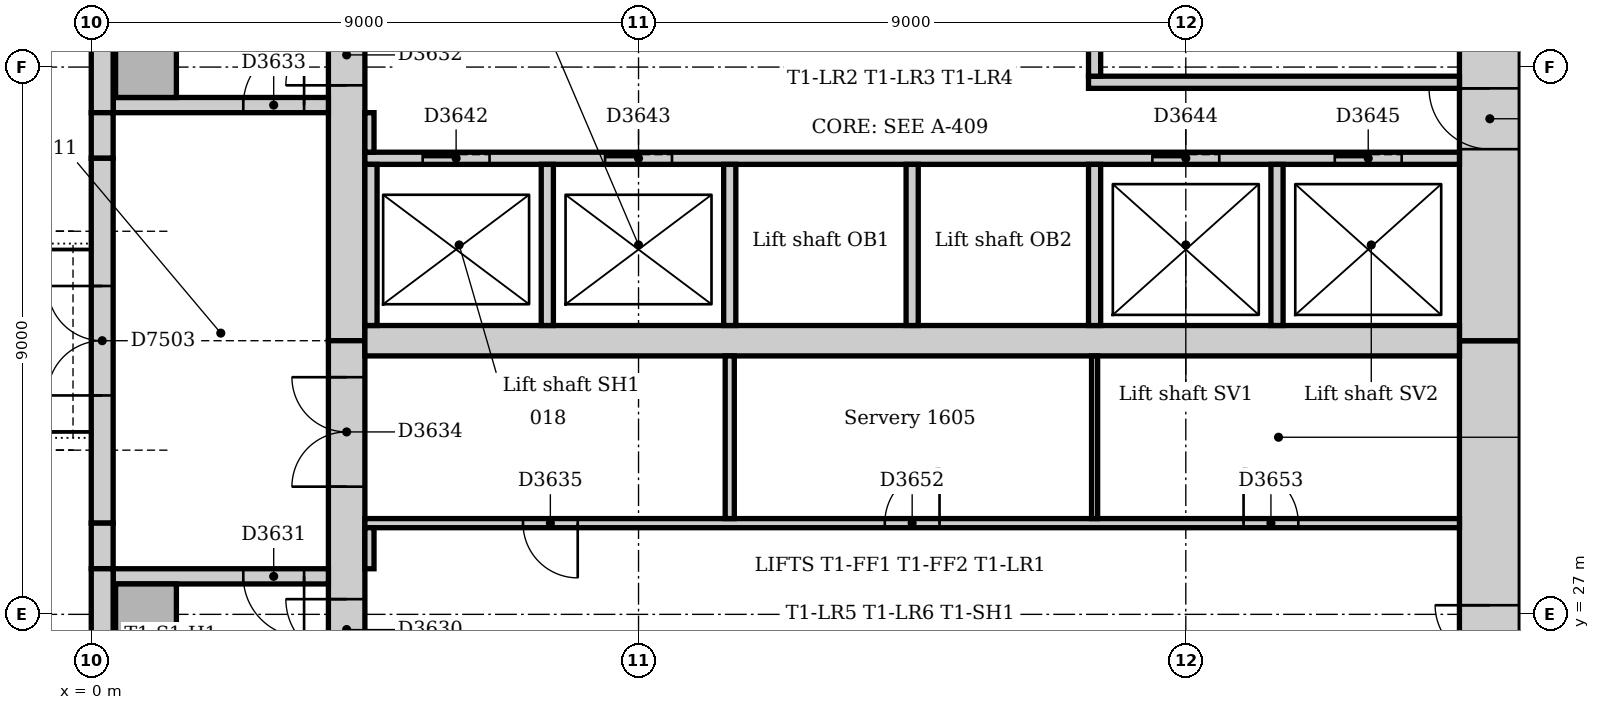
"""IFC4 building model, lengths in metres.
Left out: names, types, materials, properties, quantities, classifications, styles, units other than length and angle.
Written with IfcOpenShell. Run it as: python <this file> out.ifc"""

import sys

from ifc_helpers import new_model, si_unit, direction, frame, frame_2d, origin, origin_2d, place, context, subcontext, project, spatial, rectangle, extrude, element, fill, save


model = new_model("IFC4")
c1 = context("Model", 3, precision=1e-05, world=origin(), true_north=direction((0.0, 1.0)))
c2 = subcontext(c1, "Body", "Model", "MODEL_VIEW")
j1 = project(units=[si_unit("LENGTHUNIT", "METRE"), si_unit("PLANEANGLEUNIT", "RADIAN")], contexts=[c1])
p1 = place(None, origin())
s1 = spatial("IfcSite", under=j1, at=p1, CompositionType="ELEMENT")
p2 = place(p1, origin())
s2 = spatial("IfcBuilding", under=s1, at=p2, CompositionType="ELEMENT")
p3 = place(p2, frame((0.0, 0.0, 71.0)))
s3 = spatial("IfcBuildingStorey", under=s2, at=p3, CompositionType="ELEMENT", Elevation=71.0)
p4 = place(p3, frame((23.0, 21.0, 0.0), z_axis=(0.0, 0.0, 1.0), x_axis=(0.0, 1.0, 0.0)))
e1 = element("IfcWall", 1, at=p4, inside=s3, PredefinedType="SOLIDWALL", context=c2, shape_type="SweptSolid", body=[
    extrude(rectangle(XDim=10.5, YDim=1.0, at=frame_2d((5.25, 0.0))), origin(), (0.0, 0.0, 1.0), 4.0),
])
p5 = place(p4, frame((4.35, 0.0, 0.0)))
e2 = element("IfcOpeningElement", 2, at=p5, cuts=e1, PredefinedType="OPENING", context=c2, shape_type="SweptSolid", body=[
    extrude(rectangle(XDim=1.8, YDim=2.1, at=frame_2d((0.9, 1.05))), frame((0.0, 0.51, 0.0), z_axis=(0.0, -1.0, 0.0), x_axis=(1.0, 0.0, 0.0)), (0.0, 0.0, 1.0), 1.02),
])
p6 = place(p3, frame((23.0, 31.5, 0.0), z_axis=(0.0, 0.0, 1.0), x_axis=(0.0, 1.0, 0.0)))
e3 = element("IfcWall", 3, at=p6, inside=s3, PredefinedType="SOLIDWALL", context=c2, shape_type="SweptSolid", body=[
    extrude(rectangle(XDim=10.5, YDim=1.0, at=frame_2d((5.25, 0.0))), origin(), (0.0, 0.0, 1.0), 4.0),
])
p7 = place(p6, frame((3.15, 0.0, 0.0)))
e4 = element("IfcOpeningElement", 4, at=p7, cuts=e3, PredefinedType="OPENING", context=c2, shape_type="SweptSolid", body=[
    extrude(rectangle(XDim=1.0, YDim=2.1, at=frame_2d((0.5, 1.05))), frame((0.0, 0.51, 0.0), z_axis=(0.0, -1.0, 0.0), x_axis=(1.0, 0.0, 0.0)), (0.0, 0.0, 1.0), 1.02),
])
p8 = place(p6, frame((5.2, 0.0, 0.0)))
e5 = element("IfcOpeningElement", 5, at=p8, cuts=e3, PredefinedType="OPENING", context=c2, shape_type="SweptSolid", body=[
    extrude(rectangle(XDim=1.0, YDim=2.1, at=frame_2d((0.5, 1.05))), frame((0.0, 0.51, 0.0), z_axis=(0.0, -1.0, 0.0), x_axis=(1.0, 0.0, 0.0)), (0.0, 0.0, 1.0), 1.02),
])
p9 = place(p3, frame((4.2, 42.0, 0.0), z_axis=(0.0, 0.0, 1.0), x_axis=(0.0, -1.0, 0.0)))
e6 = element("IfcWall", 6, at=p9, inside=s3, PredefinedType="SOLIDWALL", context=c2, shape_type="SweptSolid", body=[
    extrude(rectangle(XDim=10.5, YDim=0.6, at=frame_2d((5.25, 0.0))), origin(), (0.0, 0.0, 1.0), 4.0),
])
p10 = place(p9, frame((5.3, 0.0, 0.0)))
e7 = element("IfcOpeningElement", 7, at=p10, cuts=e6, PredefinedType="OPENING", context=c2, shape_type="SweptSolid", body=[
    extrude(rectangle(XDim=1.0, YDim=2.1, at=frame_2d((0.5, 1.05))), frame((0.0, 0.31, 0.0), z_axis=(0.0, -1.0, 0.0), x_axis=(1.0, 0.0, 0.0)), (0.0, 0.0, 1.0), 0.62),
])
p11 = place(p3, frame((4.2, 31.5, 0.0), z_axis=(0.0, 0.0, 1.0), x_axis=(0.0, -1.0, 0.0)))
e8 = element("IfcWall", 8, at=p11, inside=s3, PredefinedType="SOLIDWALL", context=c2, shape_type="SweptSolid", body=[
    extrude(rectangle(XDim=10.5, YDim=0.6, at=frame_2d((5.25, 0.0))), origin(), (0.0, 0.0, 1.0), 4.0),
])
p12 = place(p11, frame((4.25, 0.0, 0.0)))
e9 = element("IfcOpeningElement", 9, at=p12, cuts=e8, PredefinedType="OPENING", context=c2, shape_type="SweptSolid", body=[
    extrude(rectangle(XDim=1.0, YDim=2.1, at=frame_2d((0.5, 1.05))), frame((0.0, 0.31, 0.0), z_axis=(0.0, -1.0, 0.0), x_axis=(1.0, 0.0, 0.0)), (0.0, 0.0, 1.0), 0.62),
])
p13 = place(p11, frame((0.6, 0.0, 0.0)))
e10 = element("IfcOpeningElement", 10, at=p13, cuts=e8, PredefinedType="OPENING", context=c2, shape_type="SweptSolid", body=[
    extrude(rectangle(XDim=1.8, YDim=2.1, at=frame_2d((0.9, 1.05))), frame((0.0, 0.31, 0.0), z_axis=(0.0, -1.0, 0.0), x_axis=(1.0, 0.0, 0.0)), (0.0, 0.0, 1.0), 0.62),
])
p14 = place(p3, frame((4.5, 31.5, 0.0), z_axis=(0.0, 0.0, 1.0), x_axis=(1.0, 0.0, 0.0)))
e11 = element("IfcWall", 11, at=p14, inside=s3, PredefinedType="SOLIDWALL", context=c2, shape_type="SweptSolid", body=[
    extrude(rectangle(XDim=18.0, YDim=0.5, at=frame_2d((9.0, 0.0))), origin(), (0.0, 0.0, 1.0), 4.0),
])
p15 = place(p3, frame((3.9, 27.625, 0.0), z_axis=(0.0, 0.0, 1.0), x_axis=(-1.0, 0.0, 0.0)))
e12 = element("IfcWall", 12, at=p15, inside=s3, PredefinedType="SOLIDWALL", context=c2, shape_type="SweptSolid", body=[
    extrude(rectangle(XDim=3.54, YDim=0.25, at=frame_2d((1.77, 0.0))), origin(), (0.0, 0.0, 1.0), 4.0),
])
p16 = place(p15, frame((0.4, 0.0, 0.0)))
e13 = element("IfcOpeningElement", 13, at=p16, cuts=e12, PredefinedType="OPENING", context=c2, shape_type="SweptSolid", body=[
    extrude(rectangle(XDim=1.0, YDim=2.1, at=frame_2d((0.5, 1.05))), frame((0.0, 0.135, 0.0), z_axis=(0.0, -1.0, 0.0), x_axis=(1.0, 0.0, 0.0)), (0.0, 0.0, 1.0), 0.27),
])
p17 = place(p3, frame((0.36, 35.375, 0.0), z_axis=(0.0, 0.0, 1.0), x_axis=(1.0, 0.0, 0.0)))
e14 = element("IfcWall", 14, at=p17, inside=s3, PredefinedType="SOLIDWALL", context=c2, shape_type="SweptSolid", body=[
    extrude(rectangle(XDim=3.54, YDim=0.25, at=frame_2d((1.77, 0.0))), origin(), (0.0, 0.0, 1.0), 4.0),
])
p18 = place(p17, frame((2.14, 0.0, 0.0)))
e15 = element("IfcOpeningElement", 15, at=p18, cuts=e14, PredefinedType="OPENING", context=c2, shape_type="SweptSolid", body=[
    extrude(rectangle(XDim=1.0, YDim=2.1, at=frame_2d((0.5, 1.05))), frame((0.0, 0.135, 0.0), z_axis=(0.0, -1.0, 0.0), x_axis=(1.0, 0.0, 0.0)), (0.0, 0.0, 1.0), 0.27),
])
for number, where, z_axis, x_axis in (
    (16, (0.9, 27.0, 0.0), (0.0, 0.0, 1.0), (1.0, 0.0, 0.0)),
    (17, (0.9, 36.0, 0.0), (0.0, 0.0, 1.0), (1.0, 0.0, 0.0)),
):
    element("IfcColumn", number, at=place(p3, frame(where, z_axis=z_axis, x_axis=x_axis)), inside=s3, PredefinedType="COLUMN", context=c2, shape_type="SweptSolid", body=[
        extrude(rectangle(XDim=1.0, YDim=1.0, at=origin_2d()), origin(), (0.0, 0.0, 1.0), 4.0),
    ])
p19 = place(p3, frame((0.18, 40.757, 0.0), z_axis=(0.0, 0.0, 1.0), x_axis=(0.0, -1.0, 0.0)))
e18 = element("IfcWall", 18, at=p19, inside=s3, PredefinedType="STANDARD", context=c2, shape_type="SweptSolid", body=[
    extrude(rectangle(XDim=5.507, YDim=0.36, at=frame_2d((2.754, 0.0))), origin(), (0.0, 0.0, 1.0), 3.85),
])
p20 = place(p3, frame((0.18, 35.25, 0.0), z_axis=(0.0, 0.0, 1.0), x_axis=(0.0, -1.0, 0.0)))
e19 = element("IfcWall", 19, at=p20, inside=s3, PredefinedType="STANDARD", context=c2, shape_type="SweptSolid", body=[
    extrude(rectangle(XDim=0.75, YDim=0.36, at=frame_2d((0.375, 0.0))), origin(), (0.0, 0.0, 1.0), 3.85),
])
p21 = place(p3, frame((0.18, 34.5, 0.0), z_axis=(0.0, 0.0, 1.0), x_axis=(0.0, -1.0, 0.0)))
e20 = element("IfcWall", 20, at=p21, inside=s3, PredefinedType="STANDARD", context=c2, shape_type="SweptSolid", body=[
    extrude(rectangle(XDim=6.0, YDim=0.36, at=frame_2d((3.0, 0.0))), origin(), (0.0, 0.0, 1.0), 3.85),
])
p22 = place(p21, frame((2.1, 0.0, 0.0)))
e21 = element("IfcOpeningElement", 21, at=p22, cuts=e20, PredefinedType="OPENING", context=c2, shape_type="SweptSolid", body=[
    extrude(rectangle(XDim=1.8, YDim=2.4, at=frame_2d((0.9, 1.2))), frame((0.0, 0.19, 0.0), z_axis=(0.0, -1.0, 0.0), x_axis=(1.0, 0.0, 0.0)), (0.0, 0.0, 1.0), 0.38),
])
p23 = place(p3, frame((0.18, 28.5, 0.0), z_axis=(0.0, 0.0, 1.0), x_axis=(0.0, -1.0, 0.0)))
e22 = element("IfcWall", 22, at=p23, inside=s3, PredefinedType="STANDARD", context=c2, shape_type="SweptSolid", body=[
    extrude(rectangle(XDim=0.75, YDim=0.36, at=frame_2d((0.375, 0.0))), origin(), (0.0, 0.0, 1.0), 3.85),
])
p24 = place(p3, frame((0.18, 27.75, 0.0), z_axis=(0.0, 0.0, 1.0), x_axis=(0.0, -1.0, 0.0)))
e23 = element("IfcWall", 23, at=p24, inside=s3, PredefinedType="STANDARD", context=c2, shape_type="SweptSolid", body=[
    extrude(rectangle(XDim=6.75, YDim=0.36, at=frame_2d((3.375, 0.0))), origin(), (0.0, 0.0, 1.0), 3.85),
])
p25 = place(p3, frame((16.4, 35.75, 0.0), z_axis=(0.0, 0.0, 1.0), x_axis=(1.0, 0.0, 0.0)))
e24 = element("IfcWall", 24, at=p25, inside=s3, PredefinedType="PARTITIONING", context=c2, shape_type="SweptSolid", body=[
    extrude(rectangle(XDim=6.1, YDim=0.2, at=frame_2d((3.05, 0.0))), origin(), (0.0, 0.0, 1.0), 3.85),
])
p26 = place(p3, frame((16.5, 35.85, 0.0), z_axis=(0.0, 0.0, 1.0), x_axis=(0.0, 1.0, 0.0)))
e25 = element("IfcWall", 25, at=p26, inside=s3, PredefinedType="PARTITIONING", context=c2, shape_type="SweptSolid", body=[
    extrude(rectangle(XDim=2.55, YDim=0.2, at=frame_2d((1.275, 0.0))), origin(), (0.0, 0.0, 1.0), 3.85),
])
p27 = place(p3, frame((4.5, 34.5, 0.0), z_axis=(0.0, 0.0, 1.0), x_axis=(1.0, 0.0, 0.0)))
e26 = element("IfcWall", 26, at=p27, inside=s3, PredefinedType="PARTITIONING", context=c2, shape_type="SweptSolid", body=[
    extrude(rectangle(XDim=18.0, YDim=0.2, at=frame_2d((9.0, 0.0))), origin(), (0.0, 0.0, 1.0), 3.85),
])
p28 = place(p27, frame((0.95, 0.0, 0.0)))
e27 = element("IfcOpeningElement", 27, at=p28, cuts=e26, PredefinedType="OPENING", context=c2, shape_type="SweptSolid", body=[
    extrude(rectangle(XDim=1.1, YDim=2.1, at=frame_2d((0.55, 1.05))), frame((0.0, 0.11, 0.0), z_axis=(0.0, -1.0, 0.0), x_axis=(1.0, 0.0, 0.0)), (0.0, 0.0, 1.0), 0.22),
])
p29 = place(p27, frame((3.95, 0.0, 0.0)))
e28 = element("IfcOpeningElement", 28, at=p29, cuts=e26, PredefinedType="OPENING", context=c2, shape_type="SweptSolid", body=[
    extrude(rectangle(XDim=1.1, YDim=2.1, at=frame_2d((0.55, 1.05))), frame((0.0, 0.11, 0.0), z_axis=(0.0, -1.0, 0.0), x_axis=(1.0, 0.0, 0.0)), (0.0, 0.0, 1.0), 0.22),
])
p30 = place(p27, frame((12.95, 0.0, 0.0)))
e29 = element("IfcOpeningElement", 29, at=p30, cuts=e26, PredefinedType="OPENING", context=c2, shape_type="SweptSolid", body=[
    extrude(rectangle(XDim=1.1, YDim=2.1, at=frame_2d((0.55, 1.05))), frame((0.0, 0.11, 0.0), z_axis=(0.0, -1.0, 0.0), x_axis=(1.0, 0.0, 0.0)), (0.0, 0.0, 1.0), 0.22),
])
p31 = place(p27, frame((15.95, 0.0, 0.0)))
e30 = element("IfcOpeningElement", 30, at=p31, cuts=e26, PredefinedType="OPENING", context=c2, shape_type="SweptSolid", body=[
    extrude(rectangle(XDim=1.1, YDim=2.1, at=frame_2d((0.55, 1.05))), frame((0.0, 0.11, 0.0), z_axis=(0.0, -1.0, 0.0), x_axis=(1.0, 0.0, 0.0)), (0.0, 0.0, 1.0), 0.22),
])
for number, where, z_axis, x_axis in (
    (31, (4.6, 31.75, 0.0), (0.0, 0.0, 1.0), (0.0, 1.0, 0.0)),
    (32, (7.5, 31.75, 0.0), (0.0, 0.0, 1.0), (0.0, 1.0, 0.0)),
    (33, (10.5, 31.75, 0.0), (0.0, 0.0, 1.0), (0.0, 1.0, 0.0)),
    (34, (13.5, 31.75, 0.0), (0.0, 0.0, 1.0), (0.0, 1.0, 0.0)),
    (35, (16.5, 31.75, 0.0), (0.0, 0.0, 1.0), (0.0, 1.0, 0.0)),
    (36, (19.5, 31.75, 0.0), (0.0, 0.0, 1.0), (0.0, 1.0, 0.0)),
):
    element("IfcWall", number, at=place(p3, frame(where, z_axis=z_axis, x_axis=x_axis)), inside=s3, PredefinedType="PARTITIONING", context=c2, shape_type="SweptSolid", body=[
        extrude(rectangle(XDim=2.65, YDim=0.2, at=frame_2d((1.325, 0.0))), origin(), (0.0, 0.0, 1.0), 3.85),
    ])
p32 = place(p3, frame((4.5, 28.5, 0.0), z_axis=(0.0, 0.0, 1.0), x_axis=(1.0, 0.0, 0.0)))
e37 = element("IfcWall", 37, at=p32, inside=s3, PredefinedType="PARTITIONING", context=c2, shape_type="SweptSolid", body=[
    extrude(rectangle(XDim=18.0, YDim=0.15, at=frame_2d((9.0, 0.0))), origin(), (0.0, 0.0, 1.0), 3.85),
])
p33 = place(p32, frame((2.6, 0.0, 0.0)))
e38 = element("IfcOpeningElement", 38, at=p33, cuts=e37, PredefinedType="OPENING", context=c2, shape_type="SweptSolid", body=[
    extrude(rectangle(XDim=0.9, YDim=2.1, at=frame_2d((0.45, 1.05))), frame((0.0, 0.085, 0.0), z_axis=(0.0, -1.0, 0.0), x_axis=(1.0, 0.0, 0.0)), (0.0, 0.0, 1.0), 0.17),
])
p34 = place(p32, frame((8.55, 0.0, 0.0)))
e39 = element("IfcOpeningElement", 39, at=p34, cuts=e37, PredefinedType="OPENING", context=c2, shape_type="SweptSolid", body=[
    extrude(rectangle(XDim=0.9, YDim=2.1, at=frame_2d((0.45, 1.05))), frame((0.0, 0.085, 0.0), z_axis=(0.0, -1.0, 0.0), x_axis=(1.0, 0.0, 0.0)), (0.0, 0.0, 1.0), 0.17),
])
p35 = place(p32, frame((14.45, 0.0, 0.0)))
e40 = element("IfcOpeningElement", 40, at=p35, cuts=e37, PredefinedType="OPENING", context=c2, shape_type="SweptSolid", body=[
    extrude(rectangle(XDim=0.9, YDim=2.1, at=frame_2d((0.45, 1.05))), frame((0.0, 0.085, 0.0), z_axis=(0.0, -1.0, 0.0), x_axis=(1.0, 0.0, 0.0)), (0.0, 0.0, 1.0), 0.17),
])
p36 = place(p3, frame((10.5, 28.575, 0.0), z_axis=(0.0, 0.0, 1.0), x_axis=(0.0, 1.0, 0.0)))
e41 = element("IfcWall", 41, at=p36, inside=s3, PredefinedType="PARTITIONING", context=c2, shape_type="SweptSolid", body=[
    extrude(rectangle(XDim=2.675, YDim=0.15, at=frame_2d((1.337, 0.0))), origin(), (0.0, 0.0, 1.0), 3.85),
])
p37 = place(p3, frame((4.575, 27.75, 0.0), z_axis=(0.0, 0.0, 1.0), x_axis=(0.0, 1.0, 0.0)))
e42 = element("IfcWall", 42, at=p37, inside=s3, PredefinedType="PARTITIONING", context=c2, shape_type="SweptSolid", body=[
    extrude(rectangle(XDim=0.675, YDim=0.15, at=frame_2d((0.338, 0.0))), origin(), (0.0, 0.0, 1.0), 3.85),
])
p38 = place(p3, frame((4.575, 34.6, 0.0), z_axis=(0.0, 0.0, 1.0), x_axis=(0.0, 1.0, 0.0)))
e43 = element("IfcWall", 43, at=p38, inside=s3, PredefinedType="PARTITIONING", context=c2, shape_type="SweptSolid", body=[
    extrude(rectangle(XDim=0.65, YDim=0.15, at=frame_2d((0.325, 0.0))), origin(), (0.0, 0.0, 1.0), 3.85),
])
p39 = place(p3, frame((16.5, 28.575, 0.0), z_axis=(0.0, 0.0, 1.0), x_axis=(0.0, 1.0, 0.0)))
e44 = element("IfcWall", 44, at=p39, inside=s3, PredefinedType="PARTITIONING", context=c2, shape_type="SweptSolid", body=[
    extrude(rectangle(XDim=2.675, YDim=0.1, at=frame_2d((1.337, 0.0))), origin(), (0.0, 0.0, 1.0), 3.85),
])
p40 = place(p22, frame((1.8, 0.0, 0.0), z_axis=(0.0, 0.0, 1.0), x_axis=(-1.0, 0.0, 0.0)))
e45 = element("IfcDoor", 45, at=p40, inside=s3, OperationType="DOUBLE_DOOR_SINGLE_SWING", PredefinedType="DOOR", context=c2, shape_type="SweptSolid", body=[
    extrude(rectangle(XDim=1.8, YDim=2.4, at=frame_2d((0.9, 1.2))), frame((0.0, -0.07, 0.0), z_axis=(0.0, -1.0, 0.0), x_axis=(1.0, 0.0, 0.0)), (0.0, 0.0, 1.0), 0.05),
])
fill(e21, e45)
p41 = place(p12, frame((1.0, 0.0, 0.0), z_axis=(0.0, 0.0, 1.0), x_axis=(-1.0, 0.0, 0.0)))
e46 = element("IfcDoor", 46, at=p41, inside=s3, OperationType="SINGLE_SWING_RIGHT", PredefinedType="DOOR", context=c2, shape_type="SweptSolid", body=[
    extrude(rectangle(XDim=1.0, YDim=2.1, at=frame_2d((0.5, 1.05))), frame((0.0, 0.025, 0.0), z_axis=(0.0, -1.0, 0.0), x_axis=(1.0, 0.0, 0.0)), (0.0, 0.0, 1.0), 0.05),
])
fill(e9, e46)
p42 = place(p16, origin())
e47 = element("IfcDoor", 47, at=p42, inside=s3, OperationType="SINGLE_SWING_LEFT", PredefinedType="DOOR", context=c2, shape_type="SweptSolid", body=[
    extrude(rectangle(XDim=1.0, YDim=2.1, at=frame_2d((0.5, 1.05))), frame((0.0, 0.025, 0.0), z_axis=(0.0, -1.0, 0.0), x_axis=(1.0, 0.0, 0.0)), (0.0, 0.0, 1.0), 0.05),
])
fill(e13, e47)
p43 = place(p10, frame((1.0, 0.0, 0.0), z_axis=(0.0, 0.0, 1.0), x_axis=(-1.0, 0.0, 0.0)))
e48 = element("IfcDoor", 48, at=p43, inside=s3, OperationType="SINGLE_SWING_LEFT", PredefinedType="DOOR", context=c2, shape_type="SweptSolid", body=[
    extrude(rectangle(XDim=1.0, YDim=2.1, at=frame_2d((0.5, 1.05))), frame((0.0, 0.025, 0.0), z_axis=(0.0, -1.0, 0.0), x_axis=(1.0, 0.0, 0.0)), (0.0, 0.0, 1.0), 0.05),
])
fill(e7, e48)
p44 = place(p18, origin())
e49 = element("IfcDoor", 49, at=p44, inside=s3, OperationType="SINGLE_SWING_RIGHT", PredefinedType="DOOR", context=c2, shape_type="SweptSolid", body=[
    extrude(rectangle(XDim=1.0, YDim=2.1, at=frame_2d((0.5, 1.05))), frame((0.0, 0.025, 0.0), z_axis=(0.0, -1.0, 0.0), x_axis=(1.0, 0.0, 0.0)), (0.0, 0.0, 1.0), 0.05),
])
fill(e15, e49)
p45 = place(p13, frame((1.8, 0.0, 0.0), z_axis=(0.0, 0.0, 1.0), x_axis=(-1.0, 0.0, 0.0)))
e50 = element("IfcDoor", 50, at=p45, inside=s3, OperationType="DOUBLE_DOOR_DOUBLE_SWING", PredefinedType="DOOR", context=c2, shape_type="SweptSolid", body=[
    extrude(rectangle(XDim=1.8, YDim=2.1, at=frame_2d((0.9, 1.05))), frame((0.0, 0.025, 0.0), z_axis=(0.0, -1.0, 0.0), x_axis=(1.0, 0.0, 0.0)), (0.0, 0.0, 1.0), 0.05),
])
fill(e10, e50)
p46 = place(p33, frame((0.9, 0.0, 0.0), z_axis=(0.0, 0.0, 1.0), x_axis=(-1.0, 0.0, 0.0)))
e51 = element("IfcDoor", 51, at=p46, inside=s3, OperationType="SINGLE_SWING_LEFT", PredefinedType="DOOR", context=c2, shape_type="SweptSolid", body=[
    extrude(rectangle(XDim=0.9, YDim=2.1, at=frame_2d((0.45, 1.05))), frame((0.0, 0.025, 0.0), z_axis=(0.0, -1.0, 0.0), x_axis=(1.0, 0.0, 0.0)), (0.0, 0.0, 1.0), 0.05),
])
fill(e38, e51)
p47 = place(p28, origin())
e52 = element("IfcDoor", 52, at=p47, inside=s3, OperationType="SLIDING_TO_LEFT", PredefinedType="DOOR", context=c2, shape_type="SweptSolid", body=[
    extrude(rectangle(XDim=1.1, YDim=2.1, at=frame_2d((0.55, 1.05))), frame((0.0, 0.025, 0.0), z_axis=(0.0, -1.0, 0.0), x_axis=(1.0, 0.0, 0.0)), (0.0, 0.0, 1.0), 0.05),
])
fill(e27, e52)
p48 = place(p29, origin())
e53 = element("IfcDoor", 53, at=p48, inside=s3, OperationType="SLIDING_TO_LEFT", PredefinedType="DOOR", context=c2, shape_type="SweptSolid", body=[
    extrude(rectangle(XDim=1.1, YDim=2.1, at=frame_2d((0.55, 1.05))), frame((0.0, 0.025, 0.0), z_axis=(0.0, -1.0, 0.0), x_axis=(1.0, 0.0, 0.0)), (0.0, 0.0, 1.0), 0.05),
])
fill(e28, e53)
p49 = place(p30, origin())
e54 = element("IfcDoor", 54, at=p49, inside=s3, OperationType="SLIDING_TO_LEFT", PredefinedType="DOOR", context=c2, shape_type="SweptSolid", body=[
    extrude(rectangle(XDim=1.1, YDim=2.1, at=frame_2d((0.55, 1.05))), frame((0.0, 0.025, 0.0), z_axis=(0.0, -1.0, 0.0), x_axis=(1.0, 0.0, 0.0)), (0.0, 0.0, 1.0), 0.05),
])
fill(e29, e54)
p50 = place(p31, origin())
e55 = element("IfcDoor", 55, at=p50, inside=s3, OperationType="SLIDING_TO_LEFT", PredefinedType="DOOR", context=c2, shape_type="SweptSolid", body=[
    extrude(rectangle(XDim=1.1, YDim=2.1, at=frame_2d((0.55, 1.05))), frame((0.0, 0.025, 0.0), z_axis=(0.0, -1.0, 0.0), x_axis=(1.0, 0.0, 0.0)), (0.0, 0.0, 1.0), 0.05),
])
fill(e30, e55)
p51 = place(p5, origin())
e56 = element("IfcDoor", 56, at=p51, inside=s3, OperationType="DOUBLE_DOOR_DOUBLE_SWING", PredefinedType="DOOR", context=c2, shape_type="SweptSolid", body=[
    extrude(rectangle(XDim=1.8, YDim=2.1, at=frame_2d((0.9, 1.05))), frame((0.0, 0.025, 0.0), z_axis=(0.0, -1.0, 0.0), x_axis=(1.0, 0.0, 0.0)), (0.0, 0.0, 1.0), 0.05),
])
fill(e2, e56)
p52 = place(p7, origin())
e57 = element("IfcDoor", 57, at=p52, inside=s3, OperationType="SINGLE_SWING_RIGHT", PredefinedType="DOOR", context=c2, shape_type="SweptSolid", body=[
    extrude(rectangle(XDim=1.0, YDim=2.1, at=frame_2d((0.5, 1.05))), frame((0.0, 0.025, 0.0), z_axis=(0.0, -1.0, 0.0), x_axis=(1.0, 0.0, 0.0)), (0.0, 0.0, 1.0), 0.05),
])
fill(e4, e57)
p53 = place(p34, origin())
e58 = element("IfcDoor", 58, at=p53, inside=s3, OperationType="SINGLE_SWING_RIGHT", PredefinedType="DOOR", context=c2, shape_type="SweptSolid", body=[
    extrude(rectangle(XDim=0.9, YDim=2.1, at=frame_2d((0.45, 1.05))), frame((0.0, 0.025, 0.0), z_axis=(0.0, -1.0, 0.0), x_axis=(1.0, 0.0, 0.0)), (0.0, 0.0, 1.0), 0.05),
])
fill(e39, e58)
p54 = place(p35, origin())
e59 = element("IfcDoor", 59, at=p54, inside=s3, OperationType="SINGLE_SWING_LEFT", PredefinedType="DOOR", context=c2, shape_type="SweptSolid", body=[
    extrude(rectangle(XDim=0.9, YDim=2.1, at=frame_2d((0.45, 1.05))), frame((0.0, 0.025, 0.0), z_axis=(0.0, -1.0, 0.0), x_axis=(1.0, 0.0, 0.0)), (0.0, 0.0, 1.0), 0.05),
])
fill(e40, e59)
save(model, sys.argv[1])
